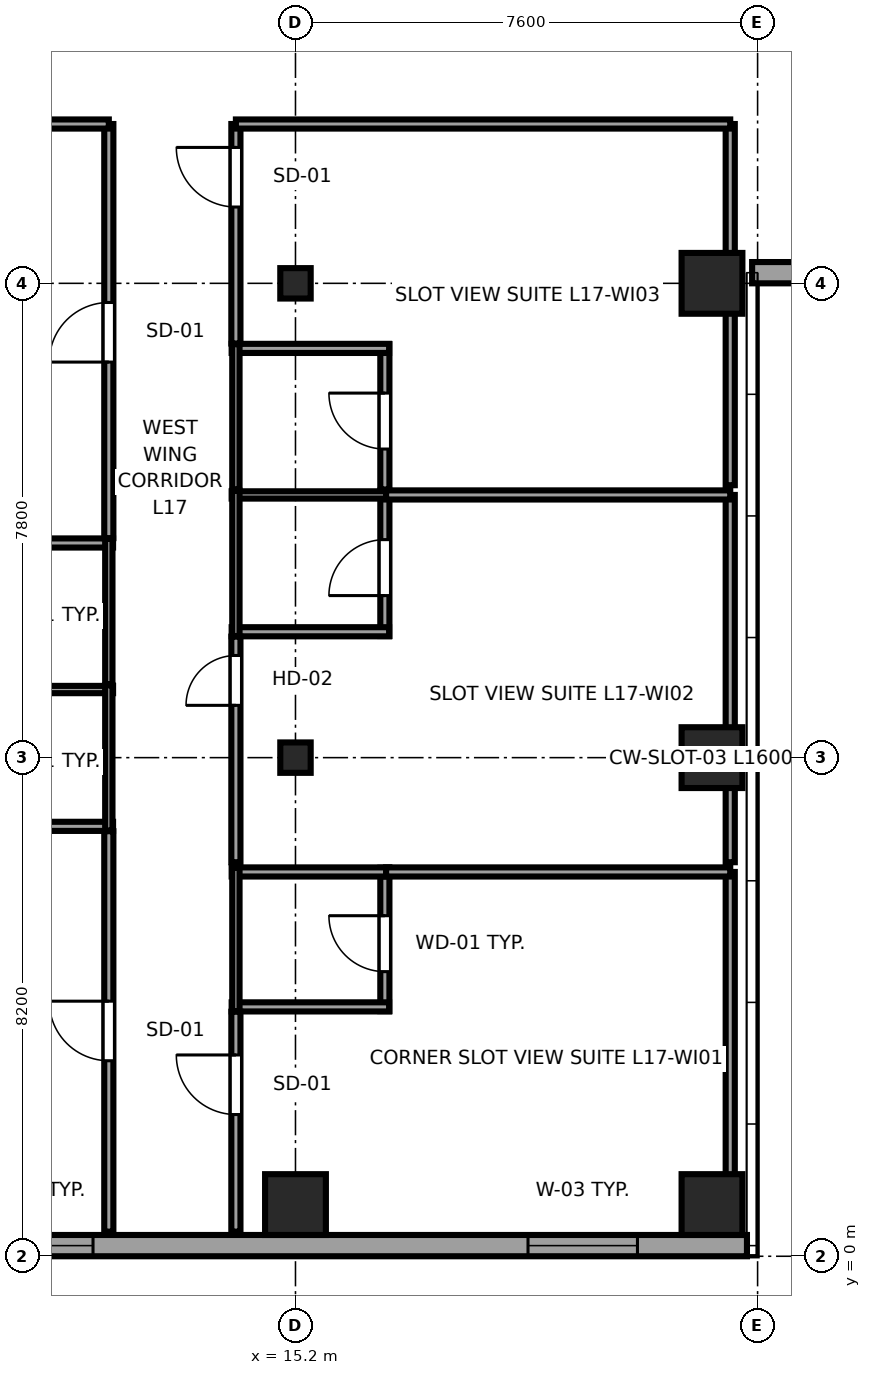
"""IFC4 building model, lengths in metres.
Left out: names, types, materials, properties, quantities, classifications, styles, units other than length and angle.
Written with IfcOpenShell. Run it as: python <this file> out.ifc"""

import sys

from ifc_helpers import new_model, si_unit, direction, frame, frame_2d, origin, origin_2d, place, context, subcontext, project, spatial, rectangle, i_section, extrude, source, transform, mapped, element, fill, save


model = new_model("IFC4")
c1 = context("Model", 3, precision=1e-05, world=origin(), true_north=direction((0.0, 1.0)))
c2 = subcontext(c1, "Body", "Model", "MODEL_VIEW")
j1 = project(units=[si_unit("LENGTHUNIT", "METRE"), si_unit("PLANEANGLEUNIT", "RADIAN")], contexts=[c1])
p1 = place(None, origin())
s1 = spatial("IfcSite", under=j1, at=p1, CompositionType="ELEMENT")
p2 = place(p1, origin())
s2 = spatial("IfcBuilding", under=s1, at=p2, CompositionType="ELEMENT")
p3 = place(p2, frame((0.0, 0.0, 71.05)))
s3 = spatial("IfcBuildingStorey", under=s2, at=p3, CompositionType="ELEMENT", Elevation=71.05)
m1 = source(origin(), c2, "Body", "SweptSolid", [
    extrude(rectangle(XDim=1.0, YDim=1.0, at=origin_2d()), origin(), (0.0, 0.0, 1.0), 3.55),
])
p4 = place(p3, frame((15.2, 0.85, 0.0), z_axis=(0.0, 0.0, 1.0), x_axis=(1.0, 0.0, 0.0)))
e1 = element("IfcColumn", 1, at=p4, inside=s3, PredefinedType="COLUMN", context=c2, shape_type="MappedRepresentation", body=[
    mapped(m1, transform((0.0, 0.0, 0.0), x_axis=(1.0, 0.0, 0.0), y_axis=(0.0, 1.0, 0.0), z_axis=(0.0, 0.0, 1.0), scale=1.0)),
])
m2 = source(origin(), c2, "Body", "SweptSolid", [
    extrude(i_section(OverallWidth=0.5, OverallDepth=0.5, WebThickness=0.028, FlangeThickness=0.045, at=origin_2d()), origin(), (0.0, 0.0, 1.0), 3.55),
])
for number, where, z_axis, x_axis in (
    (2, (15.2, 8.2, 0.0), (0.0, 0.0, 1.0), (1.0, 0.0, 0.0)),
    (3, (15.2, 16.0, 0.0), (0.0, 0.0, 1.0), (1.0, 0.0, 0.0)),
):
    element("IfcColumn", number, at=place(p3, frame(where, z_axis=z_axis, x_axis=x_axis)), inside=s3, PredefinedType="COLUMN", context=c2, shape_type="MappedRepresentation", body=[
        mapped(m2, transform((0.0, 0.0, 0.0), x_axis=(1.0, 0.0, 0.0), y_axis=(0.0, 1.0, 0.0), z_axis=(0.0, 0.0, 1.0), scale=1.0)),
    ])
for number, where, z_axis, x_axis in (
    (4, (22.05, 0.85, 0.0), (0.0, 0.0, 1.0), (1.0, 0.0, 0.0)),
    (5, (22.05, 8.2, 0.0), (0.0, 0.0, 1.0), (1.0, 0.0, 0.0)),
    (6, (22.05, 16.0, 0.0), (0.0, 0.0, 1.0), (1.0, 0.0, 0.0)),
):
    element("IfcColumn", number, at=place(p3, frame(where, z_axis=z_axis, x_axis=x_axis)), inside=s3, PredefinedType="COLUMN", context=c2, shape_type="MappedRepresentation", body=[
        mapped(m1, transform((0.0, 0.0, 0.0), x_axis=(1.0, 0.0, 0.0), y_axis=(0.0, 1.0, 0.0), z_axis=(0.0, 0.0, 1.0), scale=1.0)),
    ])
p5 = place(p3, frame((4.617, 0.175, 0.0), z_axis=(0.0, 0.0, 1.0), x_axis=(1.0, 0.0, 0.0)))
e7 = element("IfcWall", 7, at=p5, inside=s3, PredefinedType="SOLIDWALL", context=c2, shape_type="SweptSolid", body=[
    extrude(rectangle(XDim=18.008, YDim=0.35, at=frame_2d((9.004, 0.0))), origin(), (0.0, 0.0, 1.0), 3.37),
])
p6 = place(p5, frame((5.453, 0.0, 0.68)))
e8 = element("IfcOpeningElement", 8, at=p6, cuts=e7, PredefinedType="OPENING", context=c2, shape_type="SweptSolid", body=[
    extrude(rectangle(XDim=1.8, YDim=1.85, at=frame_2d((0.9, 0.925))), frame((0.0, 0.185, 0.0), z_axis=(0.0, -1.0, 0.0), x_axis=(1.0, 0.0, 0.0)), (0.0, 0.0, 1.0), 0.37),
])
p7 = place(p5, frame((14.407, 0.0, 0.68)))
e9 = element("IfcOpeningElement", 9, at=p7, cuts=e7, PredefinedType="OPENING", context=c2, shape_type="SweptSolid", body=[
    extrude(rectangle(XDim=1.8, YDim=1.85, at=frame_2d((0.9, 0.925))), frame((0.0, 0.185, 0.0), z_axis=(0.0, -1.0, 0.0), x_axis=(1.0, 0.0, 0.0)), (0.0, 0.0, 1.0), 0.37),
])
p8 = place(p3, frame((22.71, 16.175, 0.0), z_axis=(0.0, 0.0, 1.0), x_axis=(1.0, 0.0, 0.0)))
e10 = element("IfcWall", 10, at=p8, inside=s3, PredefinedType="SOLIDWALL", context=c2, shape_type="SweptSolid", body=[
    extrude(rectangle(XDim=11.58, YDim=0.35, at=frame_2d((5.79, 0.0))), origin(), (0.0, 0.0, 1.0), 2.748),
])
p9 = place(p8, frame((2.295, 0.0, 0.68)))
e11 = element("IfcOpeningElement", 11, at=p9, cuts=e10, PredefinedType="OPENING", context=c2, shape_type="SweptSolid", body=[
    extrude(rectangle(XDim=1.8, YDim=1.85, at=frame_2d((0.9, 0.925))), frame((0.0, 0.185, 0.0), z_axis=(0.0, -1.0, 0.0), x_axis=(1.0, 0.0, 0.0)), (0.0, 0.0, 1.0), 0.37),
])
p10 = place(p8, frame((7.485, 0.0, 0.68)))
e12 = element("IfcOpeningElement", 12, at=p10, cuts=e10, PredefinedType="OPENING", context=c2, shape_type="SweptSolid", body=[
    extrude(rectangle(XDim=1.8, YDim=1.85, at=frame_2d((0.9, 0.925))), frame((0.0, 0.185, 0.0), z_axis=(0.0, -1.0, 0.0), x_axis=(1.0, 0.0, 0.0)), (0.0, 0.0, 1.0), 0.37),
])
p11 = place(p3, frame((9.61, 7.07, 0.0), z_axis=(0.0, 0.0, 1.0), x_axis=(1.0, 0.0, 0.0)))
e13 = element("IfcWall", 13, at=p11, inside=s3, PredefinedType="PARTITIONING", context=c2, shape_type="SweptSolid", body=[
    extrude(rectangle(XDim=2.59, YDim=0.15, at=frame_2d((1.295, 0.0))), origin(), (0.0, 0.0, 1.0), 3.37),
])
p12 = place(p3, frame((9.61, 9.32, 0.0), z_axis=(0.0, 0.0, 1.0), x_axis=(1.0, 0.0, 0.0)))
e14 = element("IfcWall", 14, at=p12, inside=s3, PredefinedType="PLUMBINGWALL", context=c2, shape_type="SweptSolid", body=[
    extrude(rectangle(XDim=2.59, YDim=0.12, at=frame_2d((1.295, 0.0))), origin(), (0.0, 0.0, 1.0), 3.37),
])
p13 = place(p3, frame((12.13, 7.0, 0.0), z_axis=(0.0, 0.0, 1.0), x_axis=(0.0, 1.0, 0.0)))
e15 = element("IfcWall", 15, at=p13, inside=s3, PredefinedType="PLUMBINGWALL", context=c2, shape_type="SweptSolid", body=[
    extrude(rectangle(XDim=2.39, YDim=0.12, at=frame_2d((1.195, 0.0))), origin(), (0.0, 0.0, 1.0), 3.37),
])
p14 = place(p3, frame((9.61, 11.73, 0.0), z_axis=(0.0, 0.0, 1.0), x_axis=(1.0, 0.0, 0.0)))
e16 = element("IfcWall", 16, at=p14, inside=s3, PredefinedType="PARTITIONING", context=c2, shape_type="SweptSolid", body=[
    extrude(rectangle(XDim=2.59, YDim=0.15, at=frame_2d((1.295, 0.0))), origin(), (0.0, 0.0, 1.0), 3.37),
])
p15 = place(p3, frame((12.13, 9.41, 0.0), z_axis=(0.0, 0.0, 1.0), x_axis=(0.0, 1.0, 0.0)))
e17 = element("IfcWall", 17, at=p15, inside=s3, PredefinedType="PLUMBINGWALL", context=c2, shape_type="SweptSolid", body=[
    extrude(rectangle(XDim=2.39, YDim=0.12, at=frame_2d((1.195, 0.0))), origin(), (0.0, 0.0, 1.0), 3.37),
])
p16 = place(p3, frame((16.67, 4.031, 0.0), z_axis=(0.0, 0.0, 1.0), x_axis=(0.0, 1.0, 0.0)))
e18 = element("IfcWall", 18, at=p16, inside=s3, PredefinedType="PARTITIONING", context=c2, shape_type="SweptSolid", body=[
    extrude(rectangle(XDim=2.359, YDim=0.15, at=frame_2d((1.179, 0.0))), origin(), (0.0, 0.0, 1.0), 3.37),
])
p17 = place(p16, frame((0.649, 0.0, 0.0)))
e19 = element("IfcOpeningElement", 19, at=p17, cuts=e18, PredefinedType="OPENING", context=c2, shape_type="SweptSolid", body=[
    extrude(rectangle(XDim=0.92, YDim=2.01, at=frame_2d((0.46, 1.005))), frame((0.0, 0.085, 0.0), z_axis=(0.0, -1.0, 0.0), x_axis=(1.0, 0.0, 0.0)), (0.0, 0.0, 1.0), 0.17),
])
for number, where, z_axis, x_axis in (
    (20, (14.15, 4.101, 0.0), (0.0, 0.0, 1.0), (1.0, 0.0, 0.0)),
    (21, (14.15, 6.32, 0.0), (0.0, 0.0, 1.0), (1.0, 0.0, 0.0)),
):
    element("IfcWall", number, at=place(p3, frame(where, z_axis=z_axis, x_axis=x_axis)), inside=s3, PredefinedType="PARTITIONING", context=c2, shape_type="SweptSolid", body=[
        extrude(rectangle(XDim=2.59, YDim=0.15, at=frame_2d((1.295, 0.0))), origin(), (0.0, 0.0, 1.0), 3.37),
    ])
p18 = place(p3, frame((14.22, 4.031, 0.0), z_axis=(0.0, 0.0, 1.0), x_axis=(0.0, 1.0, 0.0)))
e22 = element("IfcWall", 22, at=p18, inside=s3, PredefinedType="PLUMBINGWALL", context=c2, shape_type="SweptSolid", body=[
    extrude(rectangle(XDim=2.359, YDim=0.12, at=frame_2d((1.179, 0.0))), origin(), (0.0, 0.0, 1.0), 3.37),
])
p19 = place(p3, frame((16.67, 10.2, 0.0), z_axis=(0.0, 0.0, 1.0), x_axis=(0.0, 1.0, 0.0)))
e23 = element("IfcWall", 23, at=p19, inside=s3, PredefinedType="PARTITIONING", context=c2, shape_type="SweptSolid", body=[
    extrude(rectangle(XDim=2.39, YDim=0.15, at=frame_2d((1.195, 0.0))), origin(), (0.0, 0.0, 1.0), 3.37),
])
p20 = place(p19, frame((0.665, 0.0, 0.0)))
e24 = element("IfcOpeningElement", 24, at=p20, cuts=e23, PredefinedType="OPENING", context=c2, shape_type="SweptSolid", body=[
    extrude(rectangle(XDim=0.92, YDim=2.01, at=frame_2d((0.46, 1.005))), frame((0.0, 0.085, 0.0), z_axis=(0.0, -1.0, 0.0), x_axis=(1.0, 0.0, 0.0)), (0.0, 0.0, 1.0), 0.17),
])
p21 = place(p3, frame((14.15, 10.27, 0.0), z_axis=(0.0, 0.0, 1.0), x_axis=(1.0, 0.0, 0.0)))
e25 = element("IfcWall", 25, at=p21, inside=s3, PredefinedType="PARTITIONING", context=c2, shape_type="SweptSolid", body=[
    extrude(rectangle(XDim=2.59, YDim=0.15, at=frame_2d((1.295, 0.0))), origin(), (0.0, 0.0, 1.0), 3.37),
])
p22 = place(p3, frame((14.15, 12.52, 0.0), z_axis=(0.0, 0.0, 1.0), x_axis=(1.0, 0.0, 0.0)))
e26 = element("IfcWall", 26, at=p22, inside=s3, PredefinedType="PLUMBINGWALL", context=c2, shape_type="SweptSolid", body=[
    extrude(rectangle(XDim=2.59, YDim=0.12, at=frame_2d((1.295, 0.0))), origin(), (0.0, 0.0, 1.0), 3.37),
])
p23 = place(p3, frame((14.22, 10.2, 0.0), z_axis=(0.0, 0.0, 1.0), x_axis=(0.0, 1.0, 0.0)))
e27 = element("IfcWall", 27, at=p23, inside=s3, PredefinedType="PLUMBINGWALL", context=c2, shape_type="SweptSolid", body=[
    extrude(rectangle(XDim=2.39, YDim=0.12, at=frame_2d((1.195, 0.0))), origin(), (0.0, 0.0, 1.0), 3.37),
])
p24 = place(p3, frame((16.67, 12.61, 0.0), z_axis=(0.0, 0.0, 1.0), x_axis=(0.0, 1.0, 0.0)))
e28 = element("IfcWall", 28, at=p24, inside=s3, PredefinedType="PARTITIONING", context=c2, shape_type="SweptSolid", body=[
    extrude(rectangle(XDim=2.39, YDim=0.15, at=frame_2d((1.195, 0.0))), origin(), (0.0, 0.0, 1.0), 3.37),
])
p25 = place(p24, frame((0.665, 0.0, 0.0)))
e29 = element("IfcOpeningElement", 29, at=p25, cuts=e28, PredefinedType="OPENING", context=c2, shape_type="SweptSolid", body=[
    extrude(rectangle(XDim=0.92, YDim=2.01, at=frame_2d((0.46, 1.005))), frame((0.0, 0.085, 0.0), z_axis=(0.0, -1.0, 0.0), x_axis=(1.0, 0.0, 0.0)), (0.0, 0.0, 1.0), 0.17),
])
p26 = place(p3, frame((14.15, 14.93, 0.0), z_axis=(0.0, 0.0, 1.0), x_axis=(1.0, 0.0, 0.0)))
e30 = element("IfcWall", 30, at=p26, inside=s3, PredefinedType="PARTITIONING", context=c2, shape_type="SweptSolid", body=[
    extrude(rectangle(XDim=2.59, YDim=0.15, at=frame_2d((1.295, 0.0))), origin(), (0.0, 0.0, 1.0), 3.37),
])
p27 = place(p3, frame((14.22, 12.61, 0.0), z_axis=(0.0, 0.0, 1.0), x_axis=(0.0, 1.0, 0.0)))
e31 = element("IfcWall", 31, at=p27, inside=s3, PredefinedType="PLUMBINGWALL", context=c2, shape_type="SweptSolid", body=[
    extrude(rectangle(XDim=2.39, YDim=0.12, at=frame_2d((1.195, 0.0))), origin(), (0.0, 0.0, 1.0), 3.37),
])
p28 = place(p3, frame((12.13, 0.405, 0.0), z_axis=(0.0, 0.0, 1.0), x_axis=(0.0, 1.0, 0.0)))
e32 = element("IfcWall", 32, at=p28, inside=s3, PredefinedType="PARTITIONING", context=c2, shape_type="SweptSolid", body=[
    extrude(rectangle(XDim=6.585, YDim=0.15, at=frame_2d((3.292, 0.0))), origin(), (0.0, 0.0, 1.0), 3.37),
])
p29 = place(p28, frame((2.81, 0.0, 0.0)))
e33 = element("IfcOpeningElement", 33, at=p29, cuts=e32, PredefinedType="OPENING", context=c2, shape_type="SweptSolid", body=[
    extrude(rectangle(XDim=0.98, YDim=2.12, at=frame_2d((0.49, 1.06))), frame((0.0, 0.085, 0.0), z_axis=(0.0, -1.0, 0.0), x_axis=(1.0, 0.0, 0.0)), (0.0, 0.0, 1.0), 0.17),
])
p30 = place(p3, frame((12.13, 11.81, 0.0), z_axis=(0.0, 0.0, 1.0), x_axis=(0.0, 1.0, 0.0)))
e34 = element("IfcWall", 34, at=p30, inside=s3, PredefinedType="PARTITIONING", context=c2, shape_type="SweptSolid", body=[
    extrude(rectangle(XDim=6.81, YDim=0.15, at=frame_2d((3.405, 0.0))), origin(), (0.0, 0.0, 1.0), 3.37),
])
p31 = place(p30, frame((2.895, 0.0, 0.0)))
e35 = element("IfcOpeningElement", 35, at=p31, cuts=e34, PredefinedType="OPENING", context=c2, shape_type="SweptSolid", body=[
    extrude(rectangle(XDim=0.98, YDim=2.12, at=frame_2d((0.49, 1.06))), frame((0.0, 0.085, 0.0), z_axis=(0.0, -1.0, 0.0), x_axis=(1.0, 0.0, 0.0)), (0.0, 0.0, 1.0), 0.17),
])
p32 = place(p3, frame((0.405, 18.62, 0.0), z_axis=(0.0, 0.0, 1.0), x_axis=(1.0, 0.0, 0.0)))
e36 = element("IfcWall", 36, at=p32, inside=s3, PredefinedType="PARTITIONING", context=c2, shape_type="SweptSolid", body=[
    extrude(rectangle(XDim=11.725, YDim=0.15, at=frame_2d((5.862, 0.0))), origin(), (0.0, 0.0, 1.0), 3.37),
])
p33 = place(p3, frame((14.22, 0.405, 0.0), z_axis=(0.0, 0.0, 1.0), x_axis=(0.0, 1.0, 0.0)))
e37 = element("IfcWall", 37, at=p33, inside=s3, PredefinedType="PARTITIONING", context=c2, shape_type="SweptSolid", body=[
    extrude(rectangle(XDim=3.616, YDim=0.15, at=frame_2d((1.808, 0.0))), origin(), (0.0, 0.0, 1.0), 3.37),
])
p34 = place(p33, frame((1.926, 0.0, 0.0)))
e38 = element("IfcOpeningElement", 38, at=p34, cuts=e37, PredefinedType="OPENING", context=c2, shape_type="SweptSolid", body=[
    extrude(rectangle(XDim=0.98, YDim=2.12, at=frame_2d((0.49, 1.06))), frame((0.0, 0.085, 0.0), z_axis=(0.0, -1.0, 0.0), x_axis=(1.0, 0.0, 0.0)), (0.0, 0.0, 1.0), 0.17),
])
p35 = place(p3, frame((22.35, 0.405, 0.0), z_axis=(0.0, 0.0, 1.0), x_axis=(0.0, 1.0, 0.0)))
e39 = element("IfcWall", 39, at=p35, inside=s3, PredefinedType="PARTITIONING", context=c2, shape_type="SweptSolid", body=[
    extrude(rectangle(XDim=5.915, YDim=0.15, at=frame_2d((2.958, 0.0))), origin(), (0.0, 0.0, 1.0), 3.37),
])
p36 = place(p3, frame((16.69, 6.32, 0.0), z_axis=(0.0, 0.0, 1.0), x_axis=(1.0, 0.0, 0.0)))
e40 = element("IfcWall", 40, at=p36, inside=s3, PredefinedType="PARTITIONING", context=c2, shape_type="SweptSolid", body=[
    extrude(rectangle(XDim=5.66, YDim=0.15, at=frame_2d((2.83, 0.0))), origin(), (0.0, 0.0, 1.0), 3.37),
])
p37 = place(p3, frame((14.22, 6.48, 0.0), z_axis=(0.0, 0.0, 1.0), x_axis=(0.0, 1.0, 0.0)))
e41 = element("IfcWall", 41, at=p37, inside=s3, PredefinedType="PARTITIONING", context=c2, shape_type="SweptSolid", body=[
    extrude(rectangle(XDim=3.71, YDim=0.15, at=frame_2d((1.855, 0.0))), origin(), (0.0, 0.0, 1.0), 3.37),
])
p38 = place(p37, frame((2.58, 0.0, 0.0)))
e42 = element("IfcOpeningElement", 42, at=p38, cuts=e41, PredefinedType="OPENING", context=c2, shape_type="SweptSolid", body=[
    extrude(rectangle(XDim=0.82, YDim=2.01, at=frame_2d((0.41, 1.005))), frame((0.0, 0.085, 0.0), z_axis=(0.0, -1.0, 0.0), x_axis=(1.0, 0.0, 0.0)), (0.0, 0.0, 1.0), 0.17),
])
p39 = place(p3, frame((22.35, 6.48, 0.0), z_axis=(0.0, 0.0, 1.0), x_axis=(0.0, 1.0, 0.0)))
e43 = element("IfcWall", 43, at=p39, inside=s3, PredefinedType="PARTITIONING", context=c2, shape_type="SweptSolid", body=[
    extrude(rectangle(XDim=6.04, YDim=0.15, at=frame_2d((3.02, 0.0))), origin(), (0.0, 0.0, 1.0), 3.37),
])
p40 = place(p3, frame((16.69, 12.52, 0.0), z_axis=(0.0, 0.0, 1.0), x_axis=(1.0, 0.0, 0.0)))
e44 = element("IfcWall", 44, at=p40, inside=s3, PredefinedType="PARTITIONING", context=c2, shape_type="SweptSolid", body=[
    extrude(rectangle(XDim=5.66, YDim=0.15, at=frame_2d((2.83, 0.0))), origin(), (0.0, 0.0, 1.0), 3.37),
])
p41 = place(p3, frame((14.22, 15.01, 0.0), z_axis=(0.0, 0.0, 1.0), x_axis=(0.0, 1.0, 0.0)))
e45 = element("IfcWall", 45, at=p41, inside=s3, PredefinedType="PARTITIONING", context=c2, shape_type="SweptSolid", body=[
    extrude(rectangle(XDim=3.61, YDim=0.15, at=frame_2d((1.805, 0.0))), origin(), (0.0, 0.0, 1.0), 3.37),
])
p42 = place(p41, frame((2.245, 0.0, 0.0)))
e46 = element("IfcOpeningElement", 46, at=p42, cuts=e45, PredefinedType="OPENING", context=c2, shape_type="SweptSolid", body=[
    extrude(rectangle(XDim=0.98, YDim=2.12, at=frame_2d((0.49, 1.06))), frame((0.0, 0.085, 0.0), z_axis=(0.0, -1.0, 0.0), x_axis=(1.0, 0.0, 0.0)), (0.0, 0.0, 1.0), 0.17),
])
p43 = place(p3, frame((22.35, 12.68, 0.0), z_axis=(0.0, 0.0, 1.0), x_axis=(0.0, 1.0, 0.0)))
e47 = element("IfcWall", 47, at=p43, inside=s3, PredefinedType="PARTITIONING", context=c2, shape_type="SweptSolid", body=[
    extrude(rectangle(XDim=5.94, YDim=0.15, at=frame_2d((2.97, 0.0))), origin(), (0.0, 0.0, 1.0), 3.37),
])
p44 = place(p3, frame((14.22, 18.62, 0.0), z_axis=(0.0, 0.0, 1.0), x_axis=(1.0, 0.0, 0.0)))
e48 = element("IfcWall", 48, at=p44, inside=s3, PredefinedType="PARTITIONING", context=c2, shape_type="SweptSolid", body=[
    extrude(rectangle(XDim=8.13, YDim=0.15, at=frame_2d((4.065, 0.0))), origin(), (0.0, 0.0, 1.0), 3.37),
])
m3 = source(origin(), c2, "Body", "SweptSolid", [
    extrude(rectangle(XDim=1.8, YDim=1.85, at=frame_2d((0.9, 0.925))), frame((0.0, 0.09, 0.0), z_axis=(0.0, -1.0, 0.0), x_axis=(1.0, 0.0, 0.0)), (0.0, 0.0, 1.0), 0.06),
])
p45 = place(p6, origin())
e49 = element("IfcWindow", 49, at=p45, inside=s3, PartitioningType="TRIPLE_PANEL_HORIZONTAL", PredefinedType="WINDOW", context=c2, shape_type="MappedRepresentation", body=[
    mapped(m3, transform((0.0, 0.0, 0.0), x_axis=(1.0, 0.0, 0.0), y_axis=(0.0, 1.0, 0.0), z_axis=(0.0, 0.0, 1.0), scale=1.0)),
])
fill(e8, e49)
p46 = place(p7, origin())
e50 = element("IfcWindow", 50, at=p46, inside=s3, PartitioningType="TRIPLE_PANEL_HORIZONTAL", PredefinedType="WINDOW", context=c2, shape_type="MappedRepresentation", body=[
    mapped(m3, transform((0.0, 0.0, 0.0), x_axis=(1.0, 0.0, 0.0), y_axis=(0.0, 1.0, 0.0), z_axis=(0.0, 0.0, 1.0), scale=1.0)),
])
fill(e9, e50)
m4 = source(origin(), c2, "Body", "SweptSolid", [
    extrude(rectangle(XDim=0.92, YDim=2.01, at=frame_2d((0.46, 1.005))), frame((0.0, 0.025, 0.0), z_axis=(0.0, -1.0, 0.0), x_axis=(1.0, 0.0, 0.0)), (0.0, 0.0, 1.0), 0.05),
])
p47 = place(p17, origin())
e51 = element("IfcDoor", 51, at=p47, inside=s3, OperationType="SINGLE_SWING_RIGHT", PredefinedType="DOOR", context=c2, shape_type="MappedRepresentation", body=[
    mapped(m4, transform((0.0, 0.0, 0.0), x_axis=(1.0, 0.0, 0.0), y_axis=(0.0, 1.0, 0.0), z_axis=(0.0, 0.0, 1.0), scale=1.0)),
])
fill(e19, e51)
p48 = place(p20, origin())
e52 = element("IfcDoor", 52, at=p48, inside=s3, OperationType="SINGLE_SWING_LEFT", PredefinedType="DOOR", context=c2, shape_type="MappedRepresentation", body=[
    mapped(m4, transform((0.0, 0.0, 0.0), x_axis=(1.0, 0.0, 0.0), y_axis=(0.0, 1.0, 0.0), z_axis=(0.0, 0.0, 1.0), scale=1.0)),
])
fill(e24, e52)
p49 = place(p25, origin())
e53 = element("IfcDoor", 53, at=p49, inside=s3, OperationType="SINGLE_SWING_RIGHT", PredefinedType="DOOR", context=c2, shape_type="MappedRepresentation", body=[
    mapped(m4, transform((0.0, 0.0, 0.0), x_axis=(1.0, 0.0, 0.0), y_axis=(0.0, 1.0, 0.0), z_axis=(0.0, 0.0, 1.0), scale=1.0)),
])
fill(e29, e53)
m5 = source(origin(), c2, "Body", "SweptSolid", [
    extrude(rectangle(XDim=0.98, YDim=2.12, at=frame_2d((0.49, 1.06))), frame((0.0, 0.025, 0.0), z_axis=(0.0, -1.0, 0.0), x_axis=(1.0, 0.0, 0.0)), (0.0, 0.0, 1.0), 0.05),
])
p50 = place(p29, origin())
e54 = element("IfcDoor", 54, at=p50, inside=s3, OperationType="SINGLE_SWING_RIGHT", PredefinedType="DOOR", context=c2, shape_type="MappedRepresentation", body=[
    mapped(m5, transform((0.0, 0.0, 0.0), x_axis=(1.0, 0.0, 0.0), y_axis=(0.0, 1.0, 0.0), z_axis=(0.0, 0.0, 1.0), scale=1.0)),
])
fill(e33, e54)
p51 = place(p31, origin())
e55 = element("IfcDoor", 55, at=p51, inside=s3, OperationType="SINGLE_SWING_LEFT", PredefinedType="DOOR", context=c2, shape_type="MappedRepresentation", body=[
    mapped(m5, transform((0.0, 0.0, 0.0), x_axis=(1.0, 0.0, 0.0), y_axis=(0.0, 1.0, 0.0), z_axis=(0.0, 0.0, 1.0), scale=1.0)),
])
fill(e35, e55)
p52 = place(p34, origin())
e56 = element("IfcDoor", 56, at=p52, inside=s3, OperationType="SINGLE_SWING_RIGHT", PredefinedType="DOOR", context=c2, shape_type="MappedRepresentation", body=[
    mapped(m5, transform((0.0, 0.0, 0.0), x_axis=(1.0, 0.0, 0.0), y_axis=(0.0, 1.0, 0.0), z_axis=(0.0, 0.0, 1.0), scale=1.0)),
])
fill(e38, e56)
m6 = source(origin(), c2, "Body", "SweptSolid", [
    extrude(rectangle(XDim=0.82, YDim=2.01, at=frame_2d((0.41, 1.005))), frame((0.0, 0.025, 0.0), z_axis=(0.0, -1.0, 0.0), x_axis=(1.0, 0.0, 0.0)), (0.0, 0.0, 1.0), 0.05),
])
p53 = place(p38, origin())
e57 = element("IfcDoor", 57, at=p53, inside=s3, OperationType="SINGLE_SWING_LEFT", PredefinedType="DOOR", context=c2, shape_type="MappedRepresentation", body=[
    mapped(m6, transform((0.0, 0.0, 0.0), x_axis=(1.0, 0.0, 0.0), y_axis=(0.0, 1.0, 0.0), z_axis=(0.0, 0.0, 1.0), scale=1.0)),
])
fill(e42, e57)
p54 = place(p42, origin())
e58 = element("IfcDoor", 58, at=p54, inside=s3, OperationType="SINGLE_SWING_RIGHT", PredefinedType="DOOR", context=c2, shape_type="MappedRepresentation", body=[
    mapped(m5, transform((0.0, 0.0, 0.0), x_axis=(1.0, 0.0, 0.0), y_axis=(0.0, 1.0, 0.0), z_axis=(0.0, 0.0, 1.0), scale=1.0)),
])
fill(e46, e58)
save(model, sys.argv[1])
